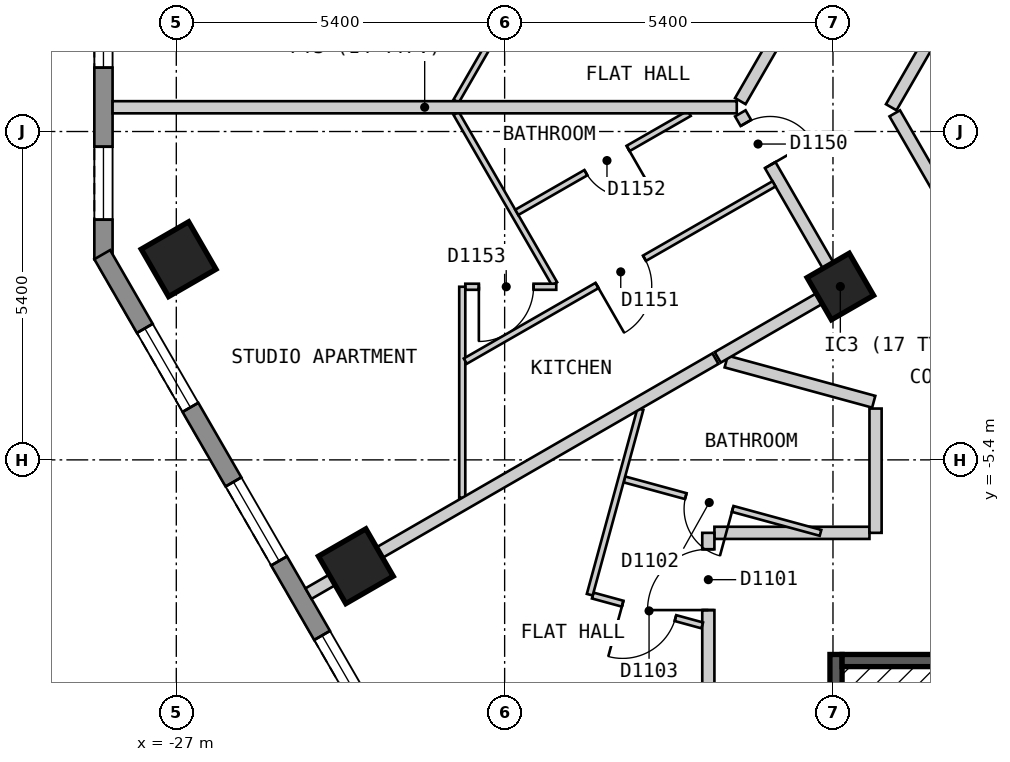
"""IFC4 building model, lengths in metres.
Left out: names, types, materials, properties, quantities, classifications, styles, units other than length and angle.
Written with IfcOpenShell. Run it as: python <this file> out.ifc"""

import sys

from ifc_helpers import new_model, si_unit, direction, frame, frame_2d, origin, origin_2d, place, context, subcontext, project, spatial, polyline, rectangle, outline, extrude, element, fill, save


model = new_model("IFC4")
c1 = context("Model", 3, precision=1e-05, world=origin(), true_north=direction((0.0, 1.0)))
c2 = subcontext(c1, "Body", "Model", "MODEL_VIEW")
j1 = project(units=[si_unit("LENGTHUNIT", "METRE"), si_unit("PLANEANGLEUNIT", "RADIAN")], contexts=[c1])
p1 = place(None, origin())
s1 = spatial("IfcSite", under=j1, at=p1, CompositionType="ELEMENT")
p2 = place(p1, origin())
s2 = spatial("IfcBuilding", under=s1, at=p2, CompositionType="ELEMENT")
p3 = place(p2, frame((0.0, 0.0, 138.6)))
s3 = spatial("IfcBuildingStorey", under=s2, at=p3, CompositionType="ELEMENT", Elevation=138.6)
for number, where, z_axis, x_axis in (
    (1, (-26.962, -2.1, 0.0), (0.0, 0.0, 1.0), (0.5, -0.866, 0.0)),
    (2, (-24.047, -7.149, 0.0), (0.0, 0.0, 1.0), (0.5, -0.866, 0.0)),
):
    element("IfcColumn", number, at=place(p3, frame(where, z_axis=z_axis, x_axis=x_axis)), inside=s3, PredefinedType="COLUMN", context=c2, shape_type="SweptSolid", body=[
        extrude(rectangle(XDim=0.9, YDim=0.9, at=origin_2d()), origin(), (0.0, 0.0, 1.0), 3.0),
    ])
p4 = place(p3, frame((-16.079, -2.549, 0.0), z_axis=(0.0, 0.0, 1.0), x_axis=(0.5, -0.866025403784, 0.0)))
e3 = element("IfcColumn", 3, at=p4, inside=s3, PredefinedType="COLUMN", context=c2, shape_type="SweptSolid", body=[
    extrude(rectangle(XDim=0.8, YDim=0.8, at=origin_2d()), origin(), (0.0, 0.0, 1.0), 3.0),
])
p5 = place(p3, frame((-28.198, 2.9, 0.0), z_axis=(0.0, 0.0, 1.0), x_axis=(0.0, -1.0, 0.0)))
e4 = element("IfcWall", 4, at=p5, inside=s3, PredefinedType="SOLIDWALL", context=c2, shape_type="SweptSolid", body=[
    extrude(outline(polyline([(0.0, -0.15), (5.0, -0.15), (4.92, 0.15), (0.08, 0.15), (0.0, -0.15)])), origin(), (0.0, 0.0, 1.0), 2.7),
])
p6 = place(p5, frame((0.65, 0.0, 0.15)))
e5 = element("IfcOpeningElement", 5, at=p6, cuts=e4, PredefinedType="OPENING", context=c2, shape_type="SweptSolid", body=[
    extrude(rectangle(XDim=1.2, YDim=2.1, at=frame_2d((0.6, 1.05))), frame((0.0, 0.16, 0.0), z_axis=(0.0, -1.0, 0.0), x_axis=(1.0, 0.0, 0.0)), (0.0, 0.0, 1.0), 0.32),
])
p7 = place(p5, frame((3.15, 0.0, 0.15)))
e6 = element("IfcOpeningElement", 6, at=p7, cuts=e4, PredefinedType="OPENING", context=c2, shape_type="SweptSolid", body=[
    extrude(rectangle(XDim=1.2, YDim=2.1, at=frame_2d((0.6, 1.05))), frame((0.0, 0.16, 0.0), z_axis=(0.0, -1.0, 0.0), x_axis=(1.0, 0.0, 0.0)), (0.0, 0.0, 1.0), 0.32),
])
p8 = place(p3, frame((-28.218, -2.025, 0.0), z_axis=(0.0, 0.0, 1.0), x_axis=(0.500017503135, -0.866015298109, 0.0)))
e7 = element("IfcWall", 7, at=p8, inside=s3, PredefinedType="SOLIDWALL", context=c2, shape_type="SweptSolid", body=[
    extrude(outline(polyline([(0.0, -0.15), (24.711, -0.15), (24.631, 0.15), (0.08, 0.15), (0.0, -0.15)])), origin(), (0.0, 0.0, 1.0), 2.7),
])
p9 = place(p8, frame((1.4, 0.0, 0.15)))
e8 = element("IfcOpeningElement", 8, at=p9, cuts=e7, PredefinedType="OPENING", context=c2, shape_type="SweptSolid", body=[
    extrude(rectangle(XDim=1.5, YDim=2.1, at=frame_2d((0.75, 1.05))), frame((0.0, 0.16, 0.0), z_axis=(0.0, -1.0, 0.0), x_axis=(1.0, 0.0, 0.0)), (0.0, 0.0, 1.0), 0.32),
])
p10 = place(p8, frame((4.316, 0.0, 0.15)))
e9 = element("IfcOpeningElement", 9, at=p10, cuts=e7, PredefinedType="OPENING", context=c2, shape_type="SweptSolid", body=[
    extrude(rectangle(XDim=1.5, YDim=2.1, at=frame_2d((0.75, 1.05))), frame((0.0, 0.16, 0.0), z_axis=(0.0, -1.0, 0.0), x_axis=(1.0, 0.0, 0.0)), (0.0, 0.0, 1.0), 0.32),
])
p11 = place(p8, frame((7.231, 0.0, 0.15)))
e10 = element("IfcOpeningElement", 10, at=p11, cuts=e7, PredefinedType="OPENING", context=c2, shape_type="SweptSolid", body=[
    extrude(rectangle(XDim=1.5, YDim=2.1, at=frame_2d((0.75, 1.05))), frame((0.0, 0.16, 0.0), z_axis=(0.0, -1.0, 0.0), x_axis=(1.0, 0.0, 0.0)), (0.0, 0.0, 1.0), 0.32),
])
p12 = place(p8, frame((10.147, 0.0, 0.15)))
e11 = element("IfcOpeningElement", 11, at=p12, cuts=e7, PredefinedType="OPENING", context=c2, shape_type="SweptSolid", body=[
    extrude(rectangle(XDim=1.5, YDim=2.1, at=frame_2d((0.75, 1.05))), frame((0.0, 0.16, 0.0), z_axis=(0.0, -1.0, 0.0), x_axis=(1.0, 0.0, 0.0)), (0.0, 0.0, 1.0), 0.32),
])
p13 = place(p8, frame((13.062, 0.0, 0.15)))
e12 = element("IfcOpeningElement", 12, at=p13, cuts=e7, PredefinedType="OPENING", context=c2, shape_type="SweptSolid", body=[
    extrude(rectangle(XDim=1.5, YDim=2.1, at=frame_2d((0.75, 1.05))), frame((0.0, 0.16, 0.0), z_axis=(0.0, -1.0, 0.0), x_axis=(1.0, 0.0, 0.0)), (0.0, 0.0, 1.0), 0.32),
])
p14 = place(p8, frame((15.977, 0.0, 0.15)))
e13 = element("IfcOpeningElement", 13, at=p14, cuts=e7, PredefinedType="OPENING", context=c2, shape_type="SweptSolid", body=[
    extrude(rectangle(XDim=1.5, YDim=2.1, at=frame_2d((0.75, 1.05))), frame((0.0, 0.16, 0.0), z_axis=(0.0, -1.0, 0.0), x_axis=(1.0, 0.0, 0.0)), (0.0, 0.0, 1.0), 0.32),
])
p15 = place(p8, frame((18.893, 0.0, 0.15)))
e14 = element("IfcOpeningElement", 14, at=p15, cuts=e7, PredefinedType="OPENING", context=c2, shape_type="SweptSolid", body=[
    extrude(rectangle(XDim=1.5, YDim=2.1, at=frame_2d((0.75, 1.05))), frame((0.0, 0.16, 0.0), z_axis=(0.0, -1.0, 0.0), x_axis=(1.0, 0.0, 0.0)), (0.0, 0.0, 1.0), 0.32),
])
p16 = place(p8, frame((21.809, 0.0, 0.15)))
e15 = element("IfcOpeningElement", 15, at=p16, cuts=e7, PredefinedType="OPENING", context=c2, shape_type="SweptSolid", body=[
    extrude(rectangle(XDim=1.5, YDim=2.1, at=frame_2d((0.75, 1.05))), frame((0.0, 0.16, 0.0), z_axis=(0.0, -1.0, 0.0), x_axis=(1.0, 0.0, 0.0)), (0.0, 0.0, 1.0), 0.32),
])
p17 = place(p3, frame((-15.184, 0.299, 0.0), z_axis=(0.0, 0.0, 1.0), x_axis=(0.500149577091, -0.865939028186, 0.0)))
e16 = element("IfcWall", 16, at=p17, inside=s3, PredefinedType="PARTITIONING", context=c2, shape_type="SweptSolid", body=[
    extrude(rectangle(XDim=3.463, YDim=0.2, at=frame_2d((1.732, 0.0))), origin(), (0.0, 0.0, 1.0), 2.7),
])
p18 = place(p3, frame((-17.724, 0.299, 0.0), z_axis=(0.0, 0.0, 1.0), x_axis=(0.499910220442, -0.866077231832, 0.0)))
e17 = element("IfcWall", 17, at=p18, inside=s3, PredefinedType="PARTITIONING", context=c2, shape_type="SweptSolid", body=[
    extrude(rectangle(XDim=3.189, YDim=0.2, at=frame_2d((1.594, 0.0))), origin(), (0.0, 0.0, 1.0), 2.7),
])
p19 = place(p18, frame((0.183, 0.0, 0.0)))
e18 = element("IfcOpeningElement", 18, at=p19, cuts=e17, PredefinedType="OPENING", context=c2, shape_type="SweptSolid", body=[
    extrude(rectangle(XDim=0.8, YDim=2.1, at=frame_2d((0.4, 1.05))), frame((0.0, 0.11, 0.0), z_axis=(0.0, -1.0, 0.0), x_axis=(1.0, 0.0, 0.0)), (0.0, 0.0, 1.0), 0.22),
])
p20 = place(p3, frame((-18.15, -6.6, 0.0), z_axis=(0.0, 0.0, 1.0), x_axis=(1.0, 0.0, 0.0)))
e19 = element("IfcWall", 19, at=p20, inside=s3, PredefinedType="PARTITIONING", context=c2, shape_type="SweptSolid", body=[
    extrude(rectangle(XDim=2.55, YDim=0.2, at=frame_2d((1.275, 0.0))), origin(), (0.0, 0.0, 1.0), 2.7),
])
p21 = place(p3, frame((-15.242, 0.399, 0.0), z_axis=(0.0, 0.0, 1.0), x_axis=(0.499953615651, 0.866052182145, 0.0)))
e20 = element("IfcWall", 20, at=p21, inside=s3, PredefinedType="PARTITIONING", context=c2, shape_type="SweptSolid", body=[
    extrude(rectangle(XDim=8.777, YDim=0.2, at=frame_2d((4.388, 0.0))), origin(), (0.0, 0.0, 1.0), 2.7),
])
p22 = place(p21, frame((3.938, 0.0, 0.0)))
e21 = element("IfcOpeningElement", 21, at=p22, cuts=e20, PredefinedType="OPENING", context=c2, shape_type="SweptSolid", body=[
    extrude(rectangle(XDim=0.9, YDim=2.1, at=frame_2d((0.45, 1.05))), frame((0.0, 0.11, 0.0), z_axis=(0.0, -1.0, 0.0), x_axis=(1.0, 0.0, 0.0)), (0.0, 0.0, 1.0), 0.22),
])
p23 = place(p3, frame((-17.724, 0.5, 0.0), z_axis=(0.0, 0.0, 1.0), x_axis=(0.499992388462, 0.866029798263, 0.0)))
e22 = element("IfcWall", 22, at=p23, inside=s3, PredefinedType="PARTITIONING", context=c2, shape_type="SweptSolid", body=[
    extrude(rectangle(XDim=16.859, YDim=0.2, at=frame_2d((8.429, 0.0))), origin(), (0.0, 0.0, 1.0), 2.7),
])
p24 = place(p23, frame((10.672, 0.0, 0.0)))
e23 = element("IfcOpeningElement", 23, at=p24, cuts=e22, PredefinedType="OPENING", context=c2, shape_type="SweptSolid", body=[
    extrude(rectangle(XDim=1.0, YDim=2.1, at=frame_2d((0.5, 1.05))), frame((0.0, 0.11, 0.0), z_axis=(0.0, -1.0, 0.0), x_axis=(1.0, 0.0, 0.0)), (0.0, 0.0, 1.0), 0.22),
])
p25 = place(p3, frame((-15.5, -6.6, 0.0), z_axis=(0.0, 0.0, 1.0), x_axis=(0.0, 1.0, 0.0)))
e24 = element("IfcWall", 24, at=p25, inside=s3, PredefinedType="PARTITIONING", context=c2, shape_type="SweptSolid", body=[
    extrude(rectangle(XDim=2.044, YDim=0.2, at=frame_2d((1.022, 0.0))), origin(), (0.0, 0.0, 1.0), 2.7),
])
p26 = place(p3, frame((-18.25, -10.478, 0.0), z_axis=(0.0, 0.0, 1.0), x_axis=(0.0, 1.0, 0.0)))
e25 = element("IfcWall", 25, at=p26, inside=s3, PredefinedType="PARTITIONING", context=c2, shape_type="SweptSolid", body=[
    extrude(rectangle(XDim=3.878, YDim=0.2, at=frame_2d((1.939, 0.0))), origin(), (0.0, 0.0, 1.0), 2.7),
])
p27 = place(p26, frame((2.608, 0.0, 0.0)))
e26 = element("IfcOpeningElement", 26, at=p27, cuts=e25, PredefinedType="OPENING", context=c2, shape_type="SweptSolid", body=[
    extrude(rectangle(XDim=1.0, YDim=2.1, at=frame_2d((0.5, 1.05))), frame((0.0, 0.11, 0.0), z_axis=(0.0, -1.0, 0.0), x_axis=(1.0, 0.0, 0.0)), (0.0, 0.0, 1.0), 0.22),
])
p28 = place(p3, frame((-22.398, 0.299, 0.0), z_axis=(0.0, 0.0, 1.0), x_axis=(0.50004249738, -0.86600086652, 0.0)))
e27 = element("IfcWall", 27, at=p28, inside=s3, PredefinedType="PARTITIONING", context=c2, shape_type="SweptSolid", body=[
    extrude(rectangle(XDim=3.236, YDim=0.1, at=frame_2d((1.618, 0.0))), origin(), (0.0, 0.0, 1.0), 2.7),
])
p29 = place(p3, frame((-19.631, -5.721, 0.0), z_axis=(0.0, 0.0, 1.0), x_axis=(0.964816035809, -0.262925877475, 0.0)))
e28 = element("IfcWall", 28, at=p29, inside=s3, PredefinedType="PARTITIONING", context=c2, shape_type="SweptSolid", body=[
    extrude(rectangle(XDim=3.344, YDim=0.1, at=frame_2d((1.672, 0.0))), origin(), (0.0, 0.0, 1.0), 2.7),
])
p30 = place(p29, frame((1.047, 0.0, 0.0)))
e29 = element("IfcOpeningElement", 29, at=p30, cuts=e28, PredefinedType="OPENING", context=c2, shape_type="SweptSolid", body=[
    extrude(rectangle(XDim=0.8, YDim=2.1, at=frame_2d((0.4, 1.05))), frame((0.0, 0.06, 0.0), z_axis=(0.0, -1.0, 0.0), x_axis=(1.0, 0.0, 0.0)), (0.0, 0.0, 1.0), 0.12),
])
p31 = place(p3, frame((-20.151, -7.631, 0.0), z_axis=(0.0, 0.0, 1.0), x_axis=(0.964784947449, -0.263039930765, 0.0)))
e30 = element("IfcWall", 30, at=p31, inside=s3, PredefinedType="PARTITIONING", context=c2, shape_type="SweptSolid", body=[
    extrude(rectangle(XDim=1.866, YDim=0.1, at=frame_2d((0.933, 0.0))), origin(), (0.0, 0.0, 1.0), 2.7),
])
p32 = place(p31, frame((0.51, 0.0, 0.0)))
e31 = element("IfcOpeningElement", 31, at=p32, cuts=e30, PredefinedType="OPENING", context=c2, shape_type="SweptSolid", body=[
    extrude(rectangle(XDim=0.9, YDim=2.1, at=frame_2d((0.45, 1.05))), frame((0.0, 0.06, 0.0), z_axis=(0.0, -1.0, 0.0), x_axis=(1.0, 0.0, 0.0)), (0.0, 0.0, 1.0), 0.12),
])
p33 = place(p3, frame((-22.247, -2.553, 0.0), z_axis=(0.0, 0.0, 1.0), x_axis=(1.0, 0.0, 0.0)))
e32 = element("IfcWall", 32, at=p33, inside=s3, PredefinedType="PARTITIONING", context=c2, shape_type="SweptSolid", body=[
    extrude(rectangle(XDim=1.496, YDim=0.1, at=frame_2d((0.748, 0.0))), origin(), (0.0, 0.0, 1.0), 2.7),
])
p34 = place(p33, frame((0.223, 0.0, 0.0)))
e33 = element("IfcOpeningElement", 33, at=p34, cuts=e32, PredefinedType="OPENING", context=c2, shape_type="SweptSolid", body=[
    extrude(rectangle(XDim=0.9, YDim=2.1, at=frame_2d((0.45, 1.05))), frame((0.0, 0.06, 0.0), z_axis=(0.0, -1.0, 0.0), x_axis=(1.0, 0.0, 0.0)), (0.0, 0.0, 1.0), 0.12),
])
p35 = place(p3, frame((-22.398, 0.499, 0.0), z_axis=(0.0, 0.0, 1.0), x_axis=(0.499981561717, 0.866036048871, 0.0)))
e34 = element("IfcWall", 34, at=p35, inside=s3, PredefinedType="PARTITIONING", context=c2, shape_type="SweptSolid", body=[
    extrude(rectangle(XDim=21.532, YDim=0.1, at=frame_2d((10.766, 0.0))), origin(), (0.0, 0.0, 1.0), 2.7),
])
p36 = place(p35, frame((13.049, 0.0, 0.0)))
e35 = element("IfcOpeningElement", 35, at=p36, cuts=e34, PredefinedType="OPENING", context=c2, shape_type="SweptSolid", body=[
    extrude(rectangle(XDim=0.9, YDim=2.1, at=frame_2d((0.45, 1.05))), frame((0.0, 0.06, 0.0), z_axis=(0.0, -1.0, 0.0), x_axis=(1.0, 0.0, 0.0)), (0.0, 0.0, 1.0), 0.12),
])
p37 = place(p35, frame((2.183, 0.0, 0.0)))
e36 = element("IfcOpeningElement", 36, at=p37, cuts=e34, PredefinedType="OPENING", context=c2, shape_type="SweptSolid", body=[
    extrude(rectangle(XDim=0.8, YDim=2.1, at=frame_2d((0.4, 1.05))), frame((0.0, 0.06, 0.0), z_axis=(0.0, -1.0, 0.0), x_axis=(1.0, 0.0, 0.0)), (0.0, 0.0, 1.0), 0.12),
])
p38 = place(p3, frame((-20.2, -7.617, 0.0), z_axis=(0.0, 0.0, 1.0), x_axis=(0.263150035392, 0.964754921663, 0.0)))
e37 = element("IfcWall", 37, at=p38, inside=s3, PredefinedType="PARTITIONING", context=c2, shape_type="SweptSolid", body=[
    extrude(rectangle(XDim=3.166, YDim=0.1, at=frame_2d((1.583, 0.0))), origin(), (0.0, 0.0, 1.0), 2.7),
])
p39 = place(p3, frame((-22.297, -6.023, 0.0), z_axis=(0.0, 0.0, 1.0), x_axis=(0.0, 1.0, 0.0)))
e38 = element("IfcWall", 38, at=p39, inside=s3, PredefinedType="PARTITIONING", context=c2, shape_type="SweptSolid", body=[
    extrude(rectangle(XDim=3.47, YDim=0.1, at=frame_2d((1.735, 0.0))), origin(), (0.0, 0.0, 1.0), 2.7),
])
p40 = place(p3, frame((-22.247, -3.776, 0.0), z_axis=(0.0, 0.0, 1.0), x_axis=(0.867243093247, 0.497884943752, 0.0)))
e39 = element("IfcWall", 39, at=p40, inside=s3, PredefinedType="PARTITIONING", context=c2, shape_type="SweptSolid", body=[
    extrude(rectangle(XDim=5.854, YDim=0.1, at=frame_2d((2.927, 0.0))), origin(), (0.0, 0.0, 1.0), 2.7),
])
p41 = place(p40, frame((2.498, 0.0, 0.0)))
e40 = element("IfcOpeningElement", 40, at=p41, cuts=e39, PredefinedType="OPENING", context=c2, shape_type="SweptSolid", body=[
    extrude(rectangle(XDim=0.9, YDim=2.1, at=frame_2d((0.45, 1.05))), frame((0.0, 0.06, 0.0), z_axis=(0.0, -1.0, 0.0), x_axis=(1.0, 0.0, 0.0)), (0.0, 0.0, 1.0), 0.12),
])
p42 = place(p3, frame((-21.4, -1.329, 0.0), z_axis=(0.0, 0.0, 1.0), x_axis=(0.867235187435, 0.497898714274, 0.0)))
e41 = element("IfcWall", 41, at=p42, inside=s3, PredefinedType="PARTITIONING", context=c2, shape_type="SweptSolid", body=[
    extrude(rectangle(XDim=3.27, YDim=0.1, at=frame_2d((1.635, 0.0))), origin(), (0.0, 0.0, 1.0), 2.7),
])
p43 = place(p42, frame((1.31, 0.0, 0.0)))
e42 = element("IfcOpeningElement", 42, at=p43, cuts=e41, PredefinedType="OPENING", context=c2, shape_type="SweptSolid", body=[
    extrude(rectangle(XDim=0.8, YDim=2.1, at=frame_2d((0.4, 1.05))), frame((0.0, 0.06, 0.0), z_axis=(0.0, -1.0, 0.0), x_axis=(1.0, 0.0, 0.0)), (0.0, 0.0, 1.0), 0.12),
])
p44 = place(p3, frame((-17.956, -3.783, 0.0), z_axis=(0.0, 0.0, 1.0), x_axis=(0.964815336827, -0.2629284424, 0.0)))
e43 = element("IfcWall", 43, at=p44, inside=s3, PredefinedType="PARTITIONING", context=c2, shape_type="SweptSolid", body=[
    extrude(rectangle(XDim=2.514, YDim=0.2, at=frame_2d((1.257, 0.0))), origin(), (0.0, 0.0, 1.0), 2.7),
])
p45 = place(p3, frame((-28.048, 0.399, 0.0), z_axis=(0.0, 0.0, 1.0), x_axis=(1.0, 0.0, 0.0)))
e44 = element("IfcWall", 44, at=p45, inside=s3, PredefinedType="PARTITIONING", context=c2, shape_type="SweptSolid", body=[
    extrude(rectangle(XDim=10.266, YDim=0.2, at=frame_2d((5.133, 0.0))), origin(), (0.0, 0.0, 1.0), 2.7),
])
p46 = place(p3, frame((-24.826, -7.599, 0.0), z_axis=(0.0, 0.0, 1.0), x_axis=(0.866031973572, 0.499988620622, 0.0)))
e45 = element("IfcWall", 45, at=p46, inside=s3, PredefinedType="PARTITIONING", context=c2, shape_type="SweptSolid", body=[
    extrude(rectangle(XDim=7.728, YDim=0.2, at=frame_2d((3.864, 0.0))), origin(), (0.0, 0.0, 1.0), 2.7),
])
p47 = place(p3, frame((-18.096, -3.714, 0.0), z_axis=(0.0, 0.0, 1.0), x_axis=(0.865794513859, 0.500399700011, 0.0)))
e46 = element("IfcWall", 46, at=p47, inside=s3, PredefinedType="PARTITIONING", context=c2, shape_type="SweptSolid", body=[
    extrude(rectangle(XDim=2.298, YDim=0.2, at=frame_2d((1.149, 0.0))), origin(), (0.0, 0.0, 1.0), 2.7),
])
p48 = place(p3, frame((-16.15, -14.4, 0.0), z_axis=(0.0, 0.0, 1.0), x_axis=(0.0, 1.0, 0.0)))
e47 = element("IfcWall", 47, at=p48, inside=s3, PredefinedType="SOLIDWALL", context=c2, shape_type="SweptSolid", body=[
    extrude(rectangle(XDim=5.8, YDim=0.2, at=frame_2d((2.9, 0.0))), origin(), (0.0, 0.0, 1.0), 2.7),
])
p49 = place(p3, frame((-16.05, -8.7, 0.0), z_axis=(0.0, 0.0, 1.0), x_axis=(1.0, 0.0, 0.0)))
e48 = element("IfcWall", 48, at=p49, inside=s3, PredefinedType="SOLIDWALL", context=c2, shape_type="SweptSolid", body=[
    extrude(rectangle(XDim=2.75, YDim=0.2, at=frame_2d((1.375, 0.0))), origin(), (0.0, 0.0, 1.0), 2.7),
])
p50 = place(p6, origin())
e49 = element("IfcWindow", 49, at=p50, inside=s3, PartitioningType="SINGLE_PANEL", PredefinedType="WINDOW", context=c2, shape_type="SweptSolid", body=[
    extrude(rectangle(XDim=1.2, YDim=2.1, at=frame_2d((0.6, 1.05))), frame((0.0, 0.03, 0.0), z_axis=(0.0, -1.0, 0.0), x_axis=(1.0, 0.0, 0.0)), (0.0, 0.0, 1.0), 0.06),
])
fill(e5, e49)
p51 = place(p7, origin())
e50 = element("IfcWindow", 50, at=p51, inside=s3, PartitioningType="SINGLE_PANEL", PredefinedType="WINDOW", context=c2, shape_type="SweptSolid", body=[
    extrude(rectangle(XDim=1.2, YDim=2.1, at=frame_2d((0.6, 1.05))), frame((0.0, 0.03, 0.0), z_axis=(0.0, -1.0, 0.0), x_axis=(1.0, 0.0, 0.0)), (0.0, 0.0, 1.0), 0.06),
])
fill(e6, e50)
p52 = place(p9, origin())
e51 = element("IfcWindow", 51, at=p52, inside=s3, PartitioningType="SINGLE_PANEL", PredefinedType="WINDOW", context=c2, shape_type="SweptSolid", body=[
    extrude(rectangle(XDim=1.5, YDim=2.1, at=frame_2d((0.75, 1.05))), frame((0.0, 0.03, 0.0), z_axis=(0.0, -1.0, 0.0), x_axis=(1.0, 0.0, 0.0)), (0.0, 0.0, 1.0), 0.06),
])
fill(e8, e51)
p53 = place(p10, origin())
e52 = element("IfcWindow", 52, at=p53, inside=s3, PartitioningType="SINGLE_PANEL", PredefinedType="WINDOW", context=c2, shape_type="SweptSolid", body=[
    extrude(rectangle(XDim=1.5, YDim=2.1, at=frame_2d((0.75, 1.05))), frame((0.0, 0.03, 0.0), z_axis=(0.0, -1.0, 0.0), x_axis=(1.0, 0.0, 0.0)), (0.0, 0.0, 1.0), 0.06),
])
fill(e9, e52)
p54 = place(p11, origin())
e53 = element("IfcWindow", 53, at=p54, inside=s3, PartitioningType="SINGLE_PANEL", PredefinedType="WINDOW", context=c2, shape_type="SweptSolid", body=[
    extrude(rectangle(XDim=1.5, YDim=2.1, at=frame_2d((0.75, 1.05))), frame((0.0, 0.03, 0.0), z_axis=(0.0, -1.0, 0.0), x_axis=(1.0, 0.0, 0.0)), (0.0, 0.0, 1.0), 0.06),
])
fill(e10, e53)
p55 = place(p27, origin())
e54 = element("IfcDoor", 54, at=p55, inside=s3, OperationType="SINGLE_SWING_LEFT", PredefinedType="DOOR", context=c2, shape_type="SweptSolid", body=[
    extrude(rectangle(XDim=1.0, YDim=2.1, at=frame_2d((0.5, 1.05))), frame((0.0, 0.025, 0.0), z_axis=(0.0, -1.0, 0.0), x_axis=(1.0, 0.0, 0.0)), (0.0, 0.0, 1.0), 0.05),
])
fill(e26, e54)
p56 = place(p30, origin())
e55 = element("IfcDoor", 55, at=p56, inside=s3, OperationType="SINGLE_SWING_RIGHT", PredefinedType="DOOR", context=c2, shape_type="SweptSolid", body=[
    extrude(rectangle(XDim=0.8, YDim=2.1, at=frame_2d((0.4, 1.05))), frame((0.0, 0.025, 0.0), z_axis=(0.0, -1.0, 0.0), x_axis=(1.0, 0.0, 0.0)), (0.0, 0.0, 1.0), 0.05),
])
fill(e29, e55)
p57 = place(p32, origin())
e56 = element("IfcDoor", 56, at=p57, inside=s3, OperationType="SINGLE_SWING_LEFT", PredefinedType="DOOR", context=c2, shape_type="SweptSolid", body=[
    extrude(rectangle(XDim=0.9, YDim=2.1, at=frame_2d((0.45, 1.05))), frame((0.0, 0.025, 0.0), z_axis=(0.0, -1.0, 0.0), x_axis=(1.0, 0.0, 0.0)), (0.0, 0.0, 1.0), 0.05),
])
fill(e31, e56)
p58 = place(p19, origin())
e57 = element("IfcDoor", 57, at=p58, inside=s3, OperationType="SINGLE_SWING_RIGHT", PredefinedType="DOOR", context=c2, shape_type="SweptSolid", body=[
    extrude(rectangle(XDim=0.8, YDim=2.1, at=frame_2d((0.4, 1.05))), frame((0.0, 0.025, 0.0), z_axis=(0.0, -1.0, 0.0), x_axis=(1.0, 0.0, 0.0)), (0.0, 0.0, 1.0), 0.05),
])
fill(e18, e57)
p59 = place(p41, origin())
e58 = element("IfcDoor", 58, at=p59, inside=s3, OperationType="SINGLE_SWING_LEFT", PredefinedType="DOOR", context=c2, shape_type="SweptSolid", body=[
    extrude(rectangle(XDim=0.9, YDim=2.1, at=frame_2d((0.45, 1.05))), frame((0.0, 0.025, 0.0), z_axis=(0.0, -1.0, 0.0), x_axis=(1.0, 0.0, 0.0)), (0.0, 0.0, 1.0), 0.05),
])
fill(e40, e58)
p60 = place(p43, origin())
e59 = element("IfcDoor", 59, at=p60, inside=s3, OperationType="SINGLE_SWING_RIGHT", PredefinedType="DOOR", context=c2, shape_type="SweptSolid", body=[
    extrude(rectangle(XDim=0.8, YDim=2.1, at=frame_2d((0.4, 1.05))), frame((0.0, 0.025, 0.0), z_axis=(0.0, -1.0, 0.0), x_axis=(1.0, 0.0, 0.0)), (0.0, 0.0, 1.0), 0.05),
])
fill(e42, e59)
p61 = place(p34, origin())
e60 = element("IfcDoor", 60, at=p61, inside=s3, OperationType="SINGLE_SWING_LEFT", PredefinedType="DOOR", context=c2, shape_type="SweptSolid", body=[
    extrude(rectangle(XDim=0.9, YDim=2.1, at=frame_2d((0.45, 1.05))), frame((0.0, 0.025, 0.0), z_axis=(0.0, -1.0, 0.0), x_axis=(1.0, 0.0, 0.0)), (0.0, 0.0, 1.0), 0.05),
])
fill(e33, e60)
save(model, sys.argv[1])
